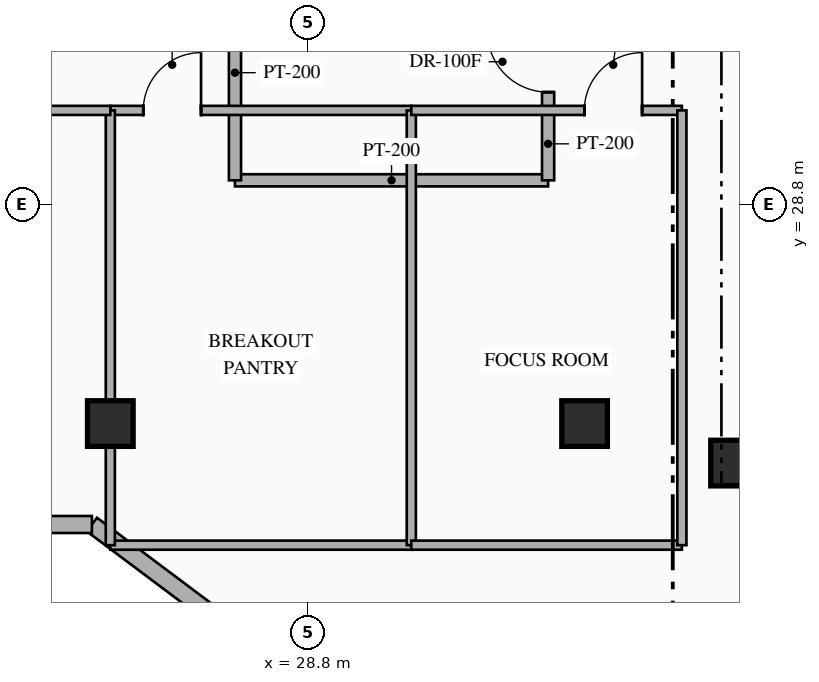
"""IFC4 building model, lengths in metres.
Left out: names, types, materials, properties, quantities, classifications, styles, units other than length and angle.
Written with IfcOpenShell. Run it as: python <this file> out.ifc"""

import sys

from ifc_helpers import new_model, si_unit, direction, frame, frame_2d, origin, origin_2d, place, context, subcontext, project, spatial, rectangle, hollow_rectangle, extrude, element, fill, save


model = new_model("IFC4")
c1 = context("Model", 3, precision=1e-05, world=origin(), true_north=direction((0.0, 1.0)))
c2 = subcontext(c1, "Body", "Model", "MODEL_VIEW")
j1 = project(units=[si_unit("LENGTHUNIT", "METRE"), si_unit("PLANEANGLEUNIT", "RADIAN")], contexts=[c1])
p1 = place(None, origin())
s1 = spatial("IfcSite", under=j1, at=p1, CompositionType="ELEMENT")
p2 = place(p1, origin())
s2 = spatial("IfcBuilding", under=s1, at=p2, CompositionType="ELEMENT")
p3 = place(p2, frame((0.0, 0.0, 213.15)))
s3 = spatial("IfcBuildingStorey", under=s2, at=p3, CompositionType="ELEMENT", Elevation=213.15)
for number, where, z_axis, x_axis in (
    (1, (35.8, 24.55, 0.0), (0.0, 0.0, 1.0), (1.0, 0.0, 0.0)),
    (2, (25.55, 25.2, 0.0), (0.0, 0.0, 1.0), (1.0, 0.0, 0.0)),
    (3, (33.35, 25.2, 0.0), (0.0, 0.0, 1.0), (1.0, 0.0, 0.0)),
):
    element("IfcColumn", number, at=place(p3, frame(where, z_axis=z_axis, x_axis=x_axis)), inside=s3, PredefinedType="COLUMN", context=c2, shape_type="SweptSolid", body=[
        extrude(hollow_rectangle(XDim=0.75, YDim=0.75, WallThickness=0.028, at=origin_2d()), origin(), (0.0, 0.0, 1.0), 3.6),
    ])
p4 = place(p3, frame((44.918, 8.787, 0.0), z_axis=(0.0, 0.0, 1.0), x_axis=(-0.800004765927, 0.599993645378, 0.0)))
e4 = element("IfcWall", 4, at=p4, inside=s3, PredefinedType="STANDARD", context=c2, shape_type="SweptSolid", body=[
    extrude(rectangle(XDim=24.588, YDim=0.28, at=frame_2d((12.294, 0.0))), origin(), (0.0, 0.0, 1.0), 3.35),
])
p5 = place(p3, frame((25.247, 23.54, 0.0), z_axis=(0.0, 0.0, 1.0), x_axis=(-1.0, 0.0, 0.0)))
e5 = element("IfcWall", 5, at=p5, inside=s3, PredefinedType="STANDARD", context=c2, shape_type="SweptSolid", body=[
    extrude(rectangle(XDim=4.789, YDim=0.28, at=frame_2d((2.395, 0.0))), origin(), (0.0, 0.0, 1.0), 3.35),
])
p6 = place(p3, frame((27.6, 29.2, 0.0), z_axis=(0.0, 0.0, 1.0), x_axis=(1.0, 0.0, 0.0)))
e6 = element("IfcWall", 6, at=p6, inside=s3, PredefinedType="STANDARD", context=c2, shape_type="SweptSolid", body=[
    extrude(rectangle(XDim=5.15, YDim=0.2, at=frame_2d((2.575, 0.0))), origin(), (0.0, 0.0, 1.0), 3.35),
])
p7 = place(p3, frame((27.6, 29.2, 0.0), z_axis=(0.0, 0.0, 1.0), x_axis=(0.0, 1.0, 0.0)))
e7 = element("IfcWall", 7, at=p7, inside=s3, PredefinedType="STANDARD", context=c2, shape_type="SweptSolid", body=[
    extrude(rectangle(XDim=3.54, YDim=0.2, at=frame_2d((1.77, 0.0))), origin(), (0.0, 0.0, 1.0), 3.35),
])
p8 = place(p3, frame((32.75, 29.2, 0.0), z_axis=(0.0, 0.0, 1.0), x_axis=(0.0, 1.0, 0.0)))
e8 = element("IfcWall", 8, at=p8, inside=s3, PredefinedType="STANDARD", context=c2, shape_type="SweptSolid", body=[
    extrude(rectangle(XDim=3.54, YDim=0.2, at=frame_2d((1.77, 0.0))), origin(), (0.0, 0.0, 1.0), 3.35),
])
p9 = place(p8, frame((1.45, 0.0, 0.0)))
e9 = element("IfcOpeningElement", 9, at=p9, cuts=e8, PredefinedType="OPENING", context=c2, shape_type="SweptSolid", body=[
    extrude(rectangle(XDim=1.0, YDim=2.2, at=frame_2d((0.5, 1.1))), frame((0.0, 0.11, 0.0), z_axis=(0.0, -1.0, 0.0), x_axis=(1.0, 0.0, 0.0)), (0.0, 0.0, 1.0), 0.22),
])
p10 = place(p3, frame((25.55, 23.2, 0.0), z_axis=(0.0, 0.0, 1.0), x_axis=(1.0, 0.0, 0.0)))
e10 = element("IfcWall", 10, at=p10, inside=s3, PredefinedType="PARTITIONING", context=c2, shape_type="SweptSolid", body=[
    extrude(rectangle(XDim=4.95, YDim=0.15, at=frame_2d((2.475, 0.0))), origin(), (0.0, 0.0, 1.0), 3.35),
])
p11 = place(p3, frame((25.55, 30.35, 0.0), z_axis=(0.0, 0.0, 1.0), x_axis=(1.0, 0.0, 0.0)))
e11 = element("IfcWall", 11, at=p11, inside=s3, PredefinedType="PARTITIONING", context=c2, shape_type="SweptSolid", body=[
    extrude(rectangle(XDim=4.95, YDim=0.15, at=frame_2d((2.475, 0.0))), origin(), (0.0, 0.0, 1.0), 3.35),
])
p12 = place(p11, frame((0.542, 0.0, 0.0)))
e12 = element("IfcOpeningElement", 12, at=p12, cuts=e11, PredefinedType="OPENING", context=c2, shape_type="SweptSolid", body=[
    extrude(rectangle(XDim=0.95, YDim=2.15, at=frame_2d((0.475, 1.075))), frame((0.0, 0.085, 0.0), z_axis=(0.0, -1.0, 0.0), x_axis=(1.0, 0.0, 0.0)), (0.0, 0.0, 1.0), 0.17),
])
p13 = place(p3, frame((25.55, 23.2, 0.0), z_axis=(0.0, 0.0, 1.0), x_axis=(0.0, 1.0, 0.0)))
e13 = element("IfcWall", 13, at=p13, inside=s3, PredefinedType="PARTITIONING", context=c2, shape_type="SweptSolid", body=[
    extrude(rectangle(XDim=7.15, YDim=0.15, at=frame_2d((3.575, 0.0))), origin(), (0.0, 0.0, 1.0), 2.757),
])
p14 = place(p3, frame((30.5, 23.2, 0.0), z_axis=(0.0, 0.0, 1.0), x_axis=(0.0, 1.0, 0.0)))
e14 = element("IfcWall", 14, at=p14, inside=s3, PredefinedType="PARTITIONING", context=c2, shape_type="SweptSolid", body=[
    extrude(rectangle(XDim=7.15, YDim=0.15, at=frame_2d((3.575, 0.0))), origin(), (0.0, 0.0, 1.0), 3.35),
])
p15 = place(p3, frame((30.5, 23.2, 0.0), z_axis=(0.0, 0.0, 1.0), x_axis=(1.0, 0.0, 0.0)))
e15 = element("IfcWall", 15, at=p15, inside=s3, PredefinedType="PARTITIONING", context=c2, shape_type="SweptSolid", body=[
    extrude(rectangle(XDim=4.45, YDim=0.15, at=frame_2d((2.225, 0.0))), origin(), (0.0, 0.0, 1.0), 3.35),
])
p16 = place(p3, frame((30.5, 30.35, 0.0), z_axis=(0.0, 0.0, 1.0), x_axis=(1.0, 0.0, 0.0)))
e16 = element("IfcWall", 16, at=p16, inside=s3, PredefinedType="PARTITIONING", context=c2, shape_type="SweptSolid", body=[
    extrude(rectangle(XDim=4.45, YDim=0.15, at=frame_2d((2.225, 0.0))), origin(), (0.0, 0.0, 1.0), 3.35),
])
p17 = place(p16, frame((2.846, 0.0, 0.0)))
e17 = element("IfcOpeningElement", 17, at=p17, cuts=e16, PredefinedType="OPENING", context=c2, shape_type="SweptSolid", body=[
    extrude(rectangle(XDim=0.95, YDim=2.15, at=frame_2d((0.475, 1.075))), frame((0.0, 0.085, 0.0), z_axis=(0.0, -1.0, 0.0), x_axis=(1.0, 0.0, 0.0)), (0.0, 0.0, 1.0), 0.17),
])
p18 = place(p3, frame((34.95, 23.2, 0.0), z_axis=(0.0, 0.0, 1.0), x_axis=(0.0, 1.0, 0.0)))
e18 = element("IfcWall", 18, at=p18, inside=s3, PredefinedType="PARTITIONING", context=c2, shape_type="SweptSolid", body=[
    extrude(rectangle(XDim=7.15, YDim=0.15, at=frame_2d((3.575, 0.0))), origin(), (0.0, 0.0, 1.0), 3.35),
])
p19 = place(p3, frame((22.25, 30.35, 0.0), z_axis=(0.0, 0.0, 1.0), x_axis=(1.0, 0.0, 0.0)))
e19 = element("IfcWall", 19, at=p19, inside=s3, PredefinedType="PARTITIONING", context=c2, shape_type="SweptSolid", body=[
    extrude(rectangle(XDim=3.3, YDim=0.15, at=frame_2d((1.65, 0.0))), origin(), (0.0, 0.0, 1.0), 3.35),
])
p20 = place(p19, frame((1.175, 0.0, 0.0)))
e20 = element("IfcOpeningElement", 20, at=p20, cuts=e19, PredefinedType="OPENING", context=c2, shape_type="SweptSolid", body=[
    extrude(rectangle(XDim=0.95, YDim=2.15, at=frame_2d((0.475, 1.075))), frame((0.0, 0.085, 0.0), z_axis=(0.0, -1.0, 0.0), x_axis=(1.0, 0.0, 0.0)), (0.0, 0.0, 1.0), 0.17),
])
p21 = place(p9, origin())
e21 = element("IfcDoor", 21, at=p21, inside=s3, OperationType="SINGLE_SWING_RIGHT", PredefinedType="DOOR", context=c2, shape_type="SweptSolid", body=[
    extrude(rectangle(XDim=1.0, YDim=2.2, at=frame_2d((0.5, 1.1))), frame((0.0, 0.025, 0.0), z_axis=(0.0, -1.0, 0.0), x_axis=(1.0, 0.0, 0.0)), (0.0, 0.0, 1.0), 0.05),
])
fill(e9, e21)
p22 = place(p12, origin())
e22 = element("IfcDoor", 22, at=p22, inside=s3, OperationType="SINGLE_SWING_RIGHT", PredefinedType="DOOR", context=c2, shape_type="SweptSolid", body=[
    extrude(rectangle(XDim=0.95, YDim=2.15, at=frame_2d((0.475, 1.075))), frame((0.0, 0.025, 0.0), z_axis=(0.0, -1.0, 0.0), x_axis=(1.0, 0.0, 0.0)), (0.0, 0.0, 1.0), 0.05),
])
fill(e12, e22)
p23 = place(p17, origin())
e23 = element("IfcDoor", 23, at=p23, inside=s3, OperationType="SINGLE_SWING_RIGHT", PredefinedType="DOOR", context=c2, shape_type="SweptSolid", body=[
    extrude(rectangle(XDim=0.95, YDim=2.15, at=frame_2d((0.475, 1.075))), frame((0.0, 0.025, 0.0), z_axis=(0.0, -1.0, 0.0), x_axis=(1.0, 0.0, 0.0)), (0.0, 0.0, 1.0), 0.05),
])
fill(e17, e23)
save(model, sys.argv[1])
